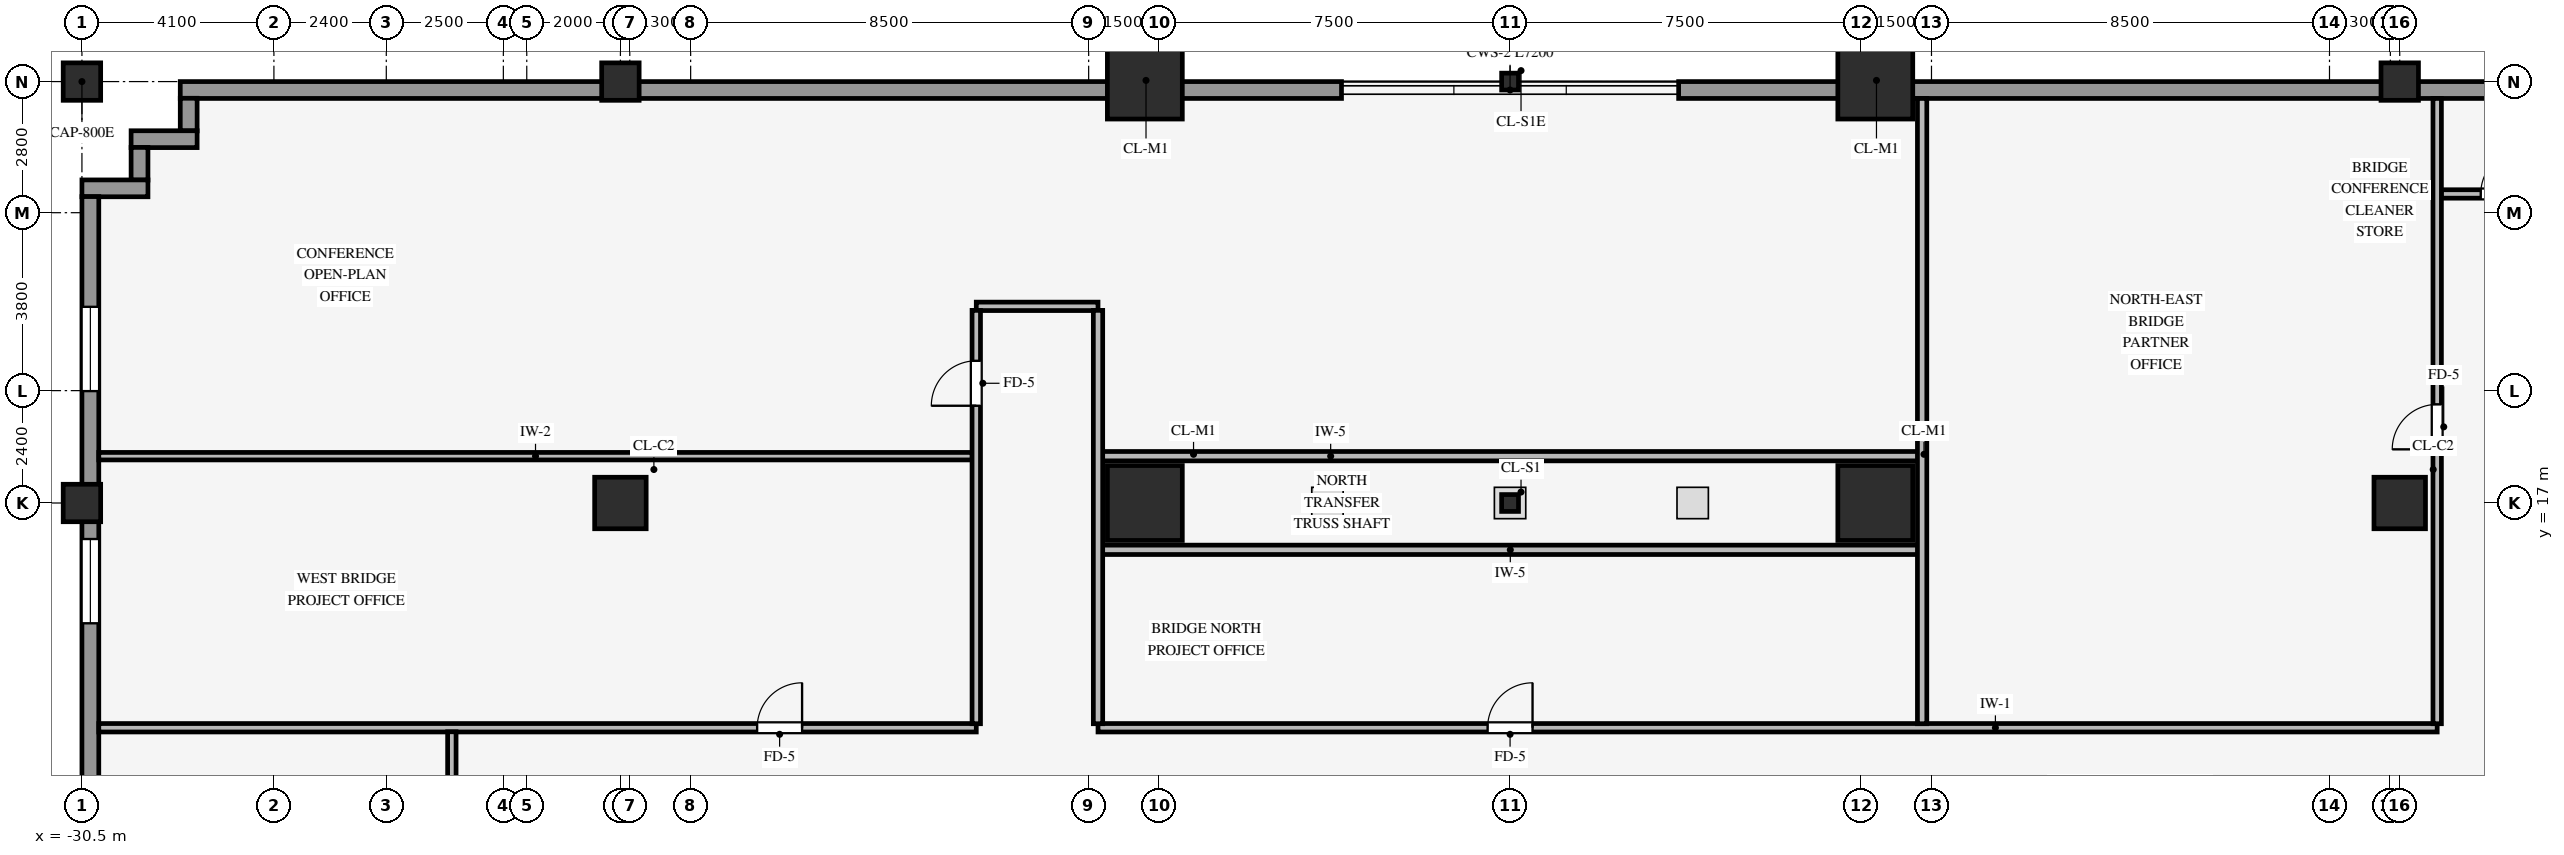
"""IFC4 building model, lengths in metres.
Left out: names, types, materials, properties, quantities, classifications, styles, units other than length and angle.
Written with IfcOpenShell. Run it as: python <this file> out.ifc"""

import sys

from ifc_helpers import new_model, si_unit, direction, frame, frame_2d, origin, origin_2d, place, context, subcontext, project, spatial, rectangle, hollow_rectangle, i_section, extrude, source, transform, mapped, element, fill, save


model = new_model("IFC4")
c1 = context("Model", 3, precision=1e-05, world=origin(), true_north=direction((0.0, 1.0)))
c2 = subcontext(c1, "Body", "Model", "MODEL_VIEW")
j1 = project(units=[si_unit("LENGTHUNIT", "METRE"), si_unit("PLANEANGLEUNIT", "RADIAN")], contexts=[c1])
p1 = place(None, origin())
s1 = spatial("IfcSite", under=j1, at=p1, CompositionType="ELEMENT")
p2 = place(p1, origin())
s2 = spatial("IfcBuilding", under=s1, at=p2, CompositionType="ELEMENT")
p3 = place(p2, frame((0.0, 0.0, 18.4)))
s3 = spatial("IfcBuildingStorey", under=s2, at=p3, CompositionType="ELEMENT", Elevation=18.4)
for number, where, z_axis, x_axis in (
    (1, (-7.8, 17.0, 0.0), (0.0, 0.0, 1.0), (1.0, 0.0, 0.0)),
    (2, (-7.8, 26.0, 0.0), (0.0, 0.0, 1.0), (1.0, 0.0, 0.0)),
    (3, (7.8, 17.0, 0.0), (0.0, 0.0, 1.0), (1.0, 0.0, 0.0)),
    (4, (7.8, 26.0, 0.0), (0.0, 0.0, 1.0), (1.0, 0.0, 0.0)),
):
    element("IfcColumn", number, at=place(p3, frame(where, z_axis=z_axis, x_axis=x_axis)), inside=s3, PredefinedType="COLUMN", context=c2, shape_type="SweptSolid", body=[
        extrude(rectangle(XDim=1.6, YDim=1.6, at=origin_2d()), origin(), (0.0, 0.0, 1.0), 4.2),
    ])
p4 = place(p3, frame((-30.5, 17.0, 0.0), z_axis=(0.0, 0.0, 1.0), x_axis=(1.0, 0.0, 0.0)))
e5 = element("IfcColumn", 5, at=p4, inside=s3, PredefinedType="COLUMN", context=c2, shape_type="SweptSolid", body=[
    extrude(hollow_rectangle(XDim=0.8, YDim=0.8, WallThickness=0.055, InnerFilletRadius=0.055, OuterFilletRadius=0.11, at=origin_2d()), origin(), (0.0, 0.0, 1.0), 4.2),
])
p5 = place(p3, frame((-30.5, 26.0, -0.4), z_axis=(0.0, 0.0, 1.0), x_axis=(1.0, 0.0, 0.0)))
e6 = element("IfcColumn", 6, at=p5, inside=s3, PredefinedType="COLUMN", context=c2, shape_type="SweptSolid", body=[
    extrude(hollow_rectangle(XDim=0.8, YDim=0.8, WallThickness=0.055, InnerFilletRadius=0.055, OuterFilletRadius=0.11, at=origin_2d()), origin(), (0.0, 0.0, 1.0), 4.6),
])
p6 = place(p3, frame((-19.0, 17.0, 0.0), z_axis=(0.0, 0.0, 1.0), x_axis=(1.0, 0.0, 0.0)))
e7 = element("IfcColumn", 7, at=p6, inside=s3, PredefinedType="COLUMN", context=c2, shape_type="SweptSolid", body=[
    extrude(rectangle(XDim=1.1, YDim=1.1, at=origin_2d()), origin(), (0.0, 0.0, 1.0), 4.2),
])
p7 = place(p3, frame((-19.0, 26.0, 0.0), z_axis=(0.0, 0.0, 1.0), x_axis=(1.0, 0.0, 0.0)))
e8 = element("IfcColumn", 8, at=p7, inside=s3, PredefinedType="COLUMN", context=c2, shape_type="SweptSolid", body=[
    extrude(hollow_rectangle(XDim=0.8, YDim=0.8, WallThickness=0.055, InnerFilletRadius=0.055, OuterFilletRadius=0.11, at=origin_2d()), origin(), (0.0, 0.0, 1.0), 4.2),
])
p8 = place(p3, frame((19.0, 17.0, 0.0), z_axis=(0.0, 0.0, 1.0), x_axis=(1.0, 0.0, 0.0)))
e9 = element("IfcColumn", 9, at=p8, inside=s3, PredefinedType="COLUMN", context=c2, shape_type="SweptSolid", body=[
    extrude(rectangle(XDim=1.1, YDim=1.1, at=origin_2d()), origin(), (0.0, 0.0, 1.0), 4.2),
])
p9 = place(p3, frame((19.0, 26.0, 0.0), z_axis=(0.0, 0.0, 1.0), x_axis=(1.0, 0.0, 0.0)))
e10 = element("IfcColumn", 10, at=p9, inside=s3, PredefinedType="COLUMN", context=c2, shape_type="SweptSolid", body=[
    extrude(hollow_rectangle(XDim=0.8, YDim=0.8, WallThickness=0.055, InnerFilletRadius=0.055, OuterFilletRadius=0.11, at=origin_2d()), origin(), (0.0, 0.0, 1.0), 4.2),
])
for number, where, z_axis, x_axis in (
    (11, (0.0, 17.0, -0.4), (0.0, 0.0, 1.0), (1.0, 0.0, 0.0)),
    (12, (0.0, 26.0, -0.4), (0.0, 0.0, 1.0), (1.0, 0.0, 0.0)),
):
    element("IfcColumn", number, at=place(p3, frame(where, z_axis=z_axis, x_axis=x_axis)), inside=s3, PredefinedType="COLUMN", context=c2, shape_type="SweptSolid", body=[
        extrude(i_section(OverallWidth=0.36, OverallDepth=0.36, WebThickness=0.021, FlangeThickness=0.021, FilletRadius=0.018, at=origin_2d()), origin(), (0.0, 0.0, 1.0), 4.6),
    ])
for number, where, z_axis, x_axis in (
    (13, (-28.4, 25.82, 0.0), (0.0, 0.0, 1.0), (1.0, 0.0, 0.0)),
    (14, (3.6, 25.82, 0.0), (0.0, 0.0, 1.0), (1.0, 0.0, 0.0)),
):
    element("IfcWall", number, at=place(p3, frame(where, z_axis=z_axis, x_axis=x_axis)), inside=s3, PredefinedType="STANDARD", context=c2, shape_type="SweptSolid", body=[
        extrude(rectangle(XDim=24.8, YDim=0.36, at=frame_2d((12.4, 0.0))), origin(), (0.0, 0.0, 1.0), 2.585),
    ])
p10 = place(p3, frame((-28.22, 24.946, 0.0), z_axis=(0.0, 0.0, 1.0), x_axis=(0.0, 1.0, 0.0)))
e15 = element("IfcWall", 15, at=p10, inside=s3, PredefinedType="STANDARD", context=c2, shape_type="SweptSolid", body=[
    extrude(rectangle(XDim=0.698, YDim=0.36, at=frame_2d((0.349, 0.0))), origin(), (0.0, 0.0, 1.0), 4.19),
])
p11 = place(p3, frame((-29.45, 24.77, 0.0), z_axis=(0.0, 0.0, 1.0), x_axis=(1.0, 0.0, 0.0)))
e16 = element("IfcWall", 16, at=p11, inside=s3, PredefinedType="STANDARD", context=c2, shape_type="SweptSolid", body=[
    extrude(rectangle(XDim=1.41, YDim=0.36, at=frame_2d((0.705, 0.0))), origin(), (0.0, 0.0, 1.0), 4.19),
])
p12 = place(p3, frame((-29.27, 23.896, 0.0), z_axis=(0.0, 0.0, 1.0), x_axis=(0.0, 1.0, 0.0)))
e17 = element("IfcWall", 17, at=p12, inside=s3, PredefinedType="STANDARD", context=c2, shape_type="SweptSolid", body=[
    extrude(rectangle(XDim=0.698, YDim=0.36, at=frame_2d((0.349, 0.0))), origin(), (0.0, 0.0, 1.0), 4.19),
])
p13 = place(p3, frame((-30.5, 23.72, 0.0), z_axis=(0.0, 0.0, 1.0), x_axis=(1.0, 0.0, 0.0)))
e18 = element("IfcWall", 18, at=p13, inside=s3, PredefinedType="STANDARD", context=c2, shape_type="SweptSolid", body=[
    extrude(rectangle(XDim=1.41, YDim=0.36, at=frame_2d((0.705, 0.0))), origin(), (0.0, 0.0, 1.0), 4.19),
])
p14 = place(p3, frame((-30.32, -23.544, 0.0), z_axis=(0.0, 0.0, 1.0), x_axis=(0.0, 1.0, 0.0)))
e19 = element("IfcWall", 19, at=p14, inside=s3, PredefinedType="STANDARD", context=c2, shape_type="SweptSolid", body=[
    extrude(rectangle(XDim=47.088, YDim=0.36, at=frame_2d((23.544, 0.0))), origin(), (0.0, 0.0, 1.0), 3.535),
])
p15 = place(p14, frame((2.354, 0.0, 0.85)))
e20 = element("IfcOpeningElement", 20, at=p15, cuts=e19, PredefinedType="OPENING", context=c2, shape_type="SweptSolid", body=[
    extrude(rectangle(XDim=1.8, YDim=2.35, at=frame_2d((0.9, 1.175))), frame((0.0, 0.19, 0.0), z_axis=(0.0, -1.0, 0.0), x_axis=(1.0, 0.0, 0.0)), (0.0, 0.0, 1.0), 0.38),
])
p16 = place(p14, frame((7.313, 0.0, 0.85)))
e21 = element("IfcOpeningElement", 21, at=p16, cuts=e19, PredefinedType="OPENING", context=c2, shape_type="SweptSolid", body=[
    extrude(rectangle(XDim=1.8, YDim=2.35, at=frame_2d((0.9, 1.175))), frame((0.0, 0.19, 0.0), z_axis=(0.0, -1.0, 0.0), x_axis=(1.0, 0.0, 0.0)), (0.0, 0.0, 1.0), 0.38),
])
p17 = place(p14, frame((15.881, 0.0, 0.85)))
e22 = element("IfcOpeningElement", 22, at=p17, cuts=e19, PredefinedType="OPENING", context=c2, shape_type="SweptSolid", body=[
    extrude(rectangle(XDim=1.8, YDim=2.35, at=frame_2d((0.9, 1.175))), frame((0.0, 0.19, 0.0), z_axis=(0.0, -1.0, 0.0), x_axis=(1.0, 0.0, 0.0)), (0.0, 0.0, 1.0), 0.38),
])
p18 = place(p14, frame((20.39, 0.0, 0.85)))
e23 = element("IfcOpeningElement", 23, at=p18, cuts=e19, PredefinedType="OPENING", context=c2, shape_type="SweptSolid", body=[
    extrude(rectangle(XDim=1.8, YDim=2.35, at=frame_2d((0.9, 1.175))), frame((0.0, 0.19, 0.0), z_axis=(0.0, -1.0, 0.0), x_axis=(1.0, 0.0, 0.0)), (0.0, 0.0, 1.0), 0.38),
])
p19 = place(p14, frame((24.898, 0.0, 0.85)))
e24 = element("IfcOpeningElement", 24, at=p19, cuts=e19, PredefinedType="OPENING", context=c2, shape_type="SweptSolid", body=[
    extrude(rectangle(XDim=1.8, YDim=2.35, at=frame_2d((0.9, 1.175))), frame((0.0, 0.19, 0.0), z_axis=(0.0, -1.0, 0.0), x_axis=(1.0, 0.0, 0.0)), (0.0, 0.0, 1.0), 0.38),
])
p20 = place(p14, frame((29.407, 0.0, 0.85)))
e25 = element("IfcOpeningElement", 25, at=p20, cuts=e19, PredefinedType="OPENING", context=c2, shape_type="SweptSolid", body=[
    extrude(rectangle(XDim=1.8, YDim=2.35, at=frame_2d((0.9, 1.175))), frame((0.0, 0.19, 0.0), z_axis=(0.0, -1.0, 0.0), x_axis=(1.0, 0.0, 0.0)), (0.0, 0.0, 1.0), 0.38),
])
p21 = place(p14, frame((37.975, 0.0, 0.85)))
e26 = element("IfcOpeningElement", 26, at=p21, cuts=e19, PredefinedType="OPENING", context=c2, shape_type="SweptSolid", body=[
    extrude(rectangle(XDim=1.8, YDim=2.35, at=frame_2d((0.9, 1.175))), frame((0.0, 0.19, 0.0), z_axis=(0.0, -1.0, 0.0), x_axis=(1.0, 0.0, 0.0)), (0.0, 0.0, 1.0), 0.38),
])
p22 = place(p14, frame((42.934, 0.0, 0.85)))
e27 = element("IfcOpeningElement", 27, at=p22, cuts=e19, PredefinedType="OPENING", context=c2, shape_type="SweptSolid", body=[
    extrude(rectangle(XDim=1.8, YDim=2.35, at=frame_2d((0.9, 1.175))), frame((0.0, 0.19, 0.0), z_axis=(0.0, -1.0, 0.0), x_axis=(1.0, 0.0, 0.0)), (0.0, 0.0, 1.0), 0.38),
])
p23 = place(p3, frame((-30.14, 12.2, 0.0), z_axis=(0.0, 0.0, 1.0), x_axis=(1.0, 0.0, 0.0)))
e28 = element("IfcWall", 28, at=p23, inside=s3, PredefinedType="PARTITIONING", context=c2, shape_type="SweptSolid", body=[
    extrude(rectangle(XDim=18.74, YDim=0.18, at=frame_2d((9.37, 0.0))), origin(), (0.0, 0.0, 1.0), 4.19),
])
p24 = place(p23, frame((14.06, 0.0, 0.0)))
e29 = element("IfcOpeningElement", 29, at=p24, cuts=e28, PredefinedType="OPENING", context=c2, shape_type="SweptSolid", body=[
    extrude(rectangle(XDim=0.96, YDim=2.1, at=frame_2d((0.48, 1.05))), frame((0.0, 0.1, 0.0), z_axis=(0.0, -1.0, 0.0), x_axis=(1.0, 0.0, 0.0)), (0.0, 0.0, 1.0), 0.2),
])
p25 = place(p3, frame((-8.8, 12.2, 0.0), z_axis=(0.0, 0.0, 1.0), x_axis=(1.0, 0.0, 0.0)))
e30 = element("IfcWall", 30, at=p25, inside=s3, PredefinedType="PARTITIONING", context=c2, shape_type="SweptSolid", body=[
    extrude(rectangle(XDim=28.6, YDim=0.18, at=frame_2d((14.3, 0.0))), origin(), (0.0, 0.0, 1.0), 4.19),
])
p26 = place(p25, frame((8.32, 0.0, 0.0)))
e31 = element("IfcOpeningElement", 31, at=p26, cuts=e30, PredefinedType="OPENING", context=c2, shape_type="SweptSolid", body=[
    extrude(rectangle(XDim=0.96, YDim=2.1, at=frame_2d((0.48, 1.05))), frame((0.0, 0.1, 0.0), z_axis=(0.0, -1.0, 0.0), x_axis=(1.0, 0.0, 0.0)), (0.0, 0.0, 1.0), 0.2),
])
p27 = place(p3, frame((-8.714, 16.0, 0.0), z_axis=(0.0, 0.0, 1.0), x_axis=(1.0, 0.0, 0.0)))
e32 = element("IfcWall", 32, at=p27, inside=s3, PredefinedType="STANDARD", context=c2, shape_type="SweptSolid", body=[
    extrude(rectangle(XDim=17.438, YDim=0.2, at=frame_2d((8.719, 0.0))), origin(), (0.0, 0.0, 1.0), 4.19),
])
p28 = place(p3, frame((-30.14, 18.0, 0.0), z_axis=(0.0, 0.0, 1.0), x_axis=(1.0, 0.0, 0.0)))
e33 = element("IfcWall", 33, at=p28, inside=s3, PredefinedType="PARTITIONING", context=c2, shape_type="SweptSolid", body=[
    extrude(rectangle(XDim=18.654, YDim=0.16, at=frame_2d((9.327, 0.0))), origin(), (0.0, 0.0, 1.0), 4.19),
])
p29 = place(p3, frame((-8.714, 18.0, 0.0), z_axis=(0.0, 0.0, 1.0), x_axis=(1.0, 0.0, 0.0)))
e34 = element("IfcWall", 34, at=p29, inside=s3, PredefinedType="STANDARD", context=c2, shape_type="SweptSolid", body=[
    extrude(rectangle(XDim=17.438, YDim=0.2, at=frame_2d((8.719, 0.0))), origin(), (0.0, 0.0, 1.0), 4.19),
])
p30 = place(p3, frame((-11.4, 21.2, 0.0), z_axis=(0.0, 0.0, 1.0), x_axis=(1.0, 0.0, 0.0)))
e35 = element("IfcWall", 35, at=p30, inside=s3, PredefinedType="PARTITIONING", context=c2, shape_type="SweptSolid", body=[
    extrude(rectangle(XDim=2.6, YDim=0.18, at=frame_2d((1.3, 0.0))), origin(), (0.0, 0.0, 1.0), 3.772),
])
p31 = place(p3, frame((19.886, 23.6, 0.0), z_axis=(0.0, 0.0, 1.0), x_axis=(1.0, 0.0, 0.0)))
e36 = element("IfcWall", 36, at=p31, inside=s3, PredefinedType="PARTITIONING", context=c2, shape_type="SweptSolid", body=[
    extrude(rectangle(XDim=2.648, YDim=0.18, at=frame_2d((1.324, 0.0))), origin(), (0.0, 0.0, 1.0), 4.19),
])
p32 = place(p31, frame((0.844, 0.0, 0.0)))
e37 = element("IfcOpeningElement", 37, at=p32, cuts=e36, PredefinedType="OPENING", context=c2, shape_type="SweptSolid", body=[
    extrude(rectangle(XDim=0.96, YDim=2.1, at=frame_2d((0.48, 1.05))), frame((0.0, 0.1, 0.0), z_axis=(0.0, -1.0, 0.0), x_axis=(1.0, 0.0, 0.0)), (0.0, 0.0, 1.0), 0.2),
])
p33 = place(p3, frame((-22.6, -12.114, 0.0), z_axis=(0.0, 0.0, 1.0), x_axis=(0.0, 1.0, 0.0)))
e38 = element("IfcWall", 38, at=p33, inside=s3, PredefinedType="PARTITIONING", context=c2, shape_type="SweptSolid", body=[
    extrude(rectangle(XDim=24.228, YDim=0.18, at=frame_2d((12.114, 0.0))), origin(), (0.0, 0.0, 1.0), 4.19),
])
p34 = place(p33, frame((11.634, 0.0, 0.0)))
e39 = element("IfcOpeningElement", 39, at=p34, cuts=e38, PredefinedType="OPENING", context=c2, shape_type="SweptSolid", body=[
    extrude(rectangle(XDim=0.96, YDim=2.1, at=frame_2d((0.48, 1.05))), frame((0.0, 0.1, 0.0), z_axis=(0.0, -1.0, 0.0), x_axis=(1.0, 0.0, 0.0)), (0.0, 0.0, 1.0), 0.2),
])
p35 = place(p3, frame((-11.4, 12.286, 0.0), z_axis=(0.0, 0.0, 1.0), x_axis=(0.0, 1.0, 0.0)))
e40 = element("IfcWall", 40, at=p35, inside=s3, PredefinedType="PARTITIONING", context=c2, shape_type="SweptSolid", body=[
    extrude(rectangle(XDim=8.828, YDim=0.18, at=frame_2d((4.414, 0.0))), origin(), (0.0, 0.0, 1.0), 4.19),
])
p36 = place(p35, frame((6.791, 0.0, 0.0)))
e41 = element("IfcOpeningElement", 41, at=p36, cuts=e40, PredefinedType="OPENING", context=c2, shape_type="SweptSolid", body=[
    extrude(rectangle(XDim=0.96, YDim=2.1, at=frame_2d((0.48, 1.05))), frame((0.0, 0.1, 0.0), z_axis=(0.0, -1.0, 0.0), x_axis=(1.0, 0.0, 0.0)), (0.0, 0.0, 1.0), 0.2),
])
p37 = place(p3, frame((-8.8, 12.286, 0.0), z_axis=(0.0, 0.0, 1.0), x_axis=(0.0, 1.0, 0.0)))
e42 = element("IfcWall", 42, at=p37, inside=s3, PredefinedType="STANDARD", context=c2, shape_type="SweptSolid", body=[
    extrude(rectangle(XDim=8.828, YDim=0.2, at=frame_2d((4.414, 0.0))), origin(), (0.0, 0.0, 1.0), 4.19),
])
p38 = place(p3, frame((8.8, 12.286, 0.0), z_axis=(0.0, 0.0, 1.0), x_axis=(0.0, 1.0, 0.0)))
e43 = element("IfcWall", 43, at=p38, inside=s3, PredefinedType="STANDARD", context=c2, shape_type="SweptSolid", body=[
    extrude(rectangle(XDim=13.354, YDim=0.2, at=frame_2d((6.677, 0.0))), origin(), (0.0, 0.0, 1.0), 4.19),
])
p39 = place(p3, frame((19.8, 12.286, 0.0), z_axis=(0.0, 0.0, 1.0), x_axis=(0.0, 1.0, 0.0)))
e44 = element("IfcWall", 44, at=p39, inside=s3, PredefinedType="PARTITIONING", context=c2, shape_type="SweptSolid", body=[
    extrude(rectangle(XDim=13.354, YDim=0.18, at=frame_2d((6.677, 0.0))), origin(), (0.0, 0.0, 1.0), 4.19),
])
p40 = place(p39, frame((5.86, 0.0, 0.0)))
e45 = element("IfcOpeningElement", 45, at=p40, cuts=e44, PredefinedType="OPENING", context=c2, shape_type="SweptSolid", body=[
    extrude(rectangle(XDim=0.96, YDim=2.1, at=frame_2d((0.48, 1.05))), frame((0.0, 0.1, 0.0), z_axis=(0.0, -1.0, 0.0), x_axis=(1.0, 0.0, 0.0)), (0.0, 0.0, 1.0), 0.2),
])
m1 = source(origin(), c2, "Body", "SweptSolid", [
    extrude(rectangle(XDim=1.8, YDim=2.35, at=frame_2d((0.9, 1.175))), frame((0.0, 0.03, 0.0), z_axis=(0.0, -1.0, 0.0), x_axis=(1.0, 0.0, 0.0)), (0.0, 0.0, 1.0), 0.06),
])
p41 = place(p21, origin())
e46 = element("IfcWindow", 46, at=p41, inside=s3, PartitioningType="SINGLE_PANEL", PredefinedType="WINDOW", context=c2, shape_type="MappedRepresentation", body=[
    mapped(m1, transform((0.0, 0.0, 0.0), scale=1.0)),
])
fill(e26, e46)
p42 = place(p22, origin())
e47 = element("IfcWindow", 47, at=p42, inside=s3, PartitioningType="SINGLE_PANEL", PredefinedType="WINDOW", context=c2, shape_type="MappedRepresentation", body=[
    mapped(m1, transform((0.0, 0.0, 0.0), scale=1.0)),
])
fill(e27, e47)
m2 = source(origin(), c2, "Body", "SweptSolid", [
    extrude(rectangle(XDim=0.96, YDim=2.1, at=frame_2d((0.48, 1.05))), frame((0.0, 0.025, 0.0), z_axis=(0.0, -1.0, 0.0), x_axis=(1.0, 0.0, 0.0)), (0.0, 0.0, 1.0), 0.05),
])
p43 = place(p26, origin())
e48 = element("IfcDoor", 48, at=p43, inside=s3, OperationType="SINGLE_SWING_RIGHT", PredefinedType="DOOR", context=c2, shape_type="MappedRepresentation", body=[
    mapped(m2, transform((0.0, 0.0, 0.0), scale=1.0)),
])
fill(e31, e48)
p44 = place(p40, origin())
e49 = element("IfcDoor", 49, at=p44, inside=s3, OperationType="SINGLE_SWING_LEFT", PredefinedType="DOOR", context=c2, shape_type="MappedRepresentation", body=[
    mapped(m2, transform((0.0, 0.0, 0.0), scale=1.0)),
])
fill(e45, e49)
p45 = place(p24, origin())
e50 = element("IfcDoor", 50, at=p45, inside=s3, OperationType="SINGLE_SWING_RIGHT", PredefinedType="DOOR", context=c2, shape_type="MappedRepresentation", body=[
    mapped(m2, transform((0.0, 0.0, 0.0), scale=1.0)),
])
fill(e29, e50)
p46 = place(p36, origin())
e51 = element("IfcDoor", 51, at=p46, inside=s3, OperationType="SINGLE_SWING_LEFT", PredefinedType="DOOR", context=c2, shape_type="MappedRepresentation", body=[
    mapped(m2, transform((0.0, 0.0, 0.0), scale=1.0)),
])
fill(e41, e51)
p47 = place(p32, origin())
e52 = element("IfcDoor", 52, at=p47, inside=s3, OperationType="SINGLE_SWING_RIGHT", PredefinedType="DOOR", context=c2, shape_type="MappedRepresentation", body=[
    mapped(m2, transform((0.0, 0.0, 0.0), scale=1.0)),
])
fill(e37, e52)
save(model, sys.argv[1])
